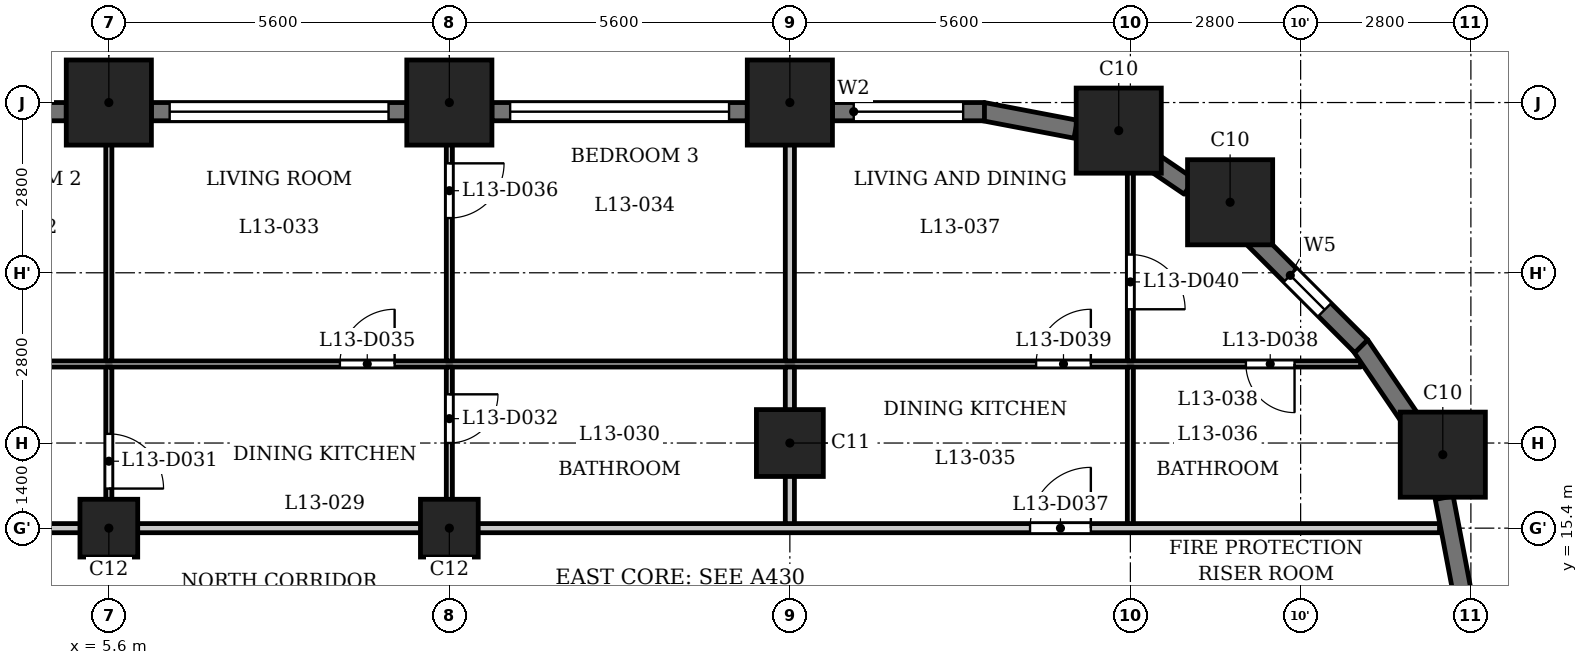
"""IFC4 building model, lengths in metres.
Left out: names, types, materials, properties, quantities, classifications, styles, units other than length and angle.
Written with IfcOpenShell. Run it as: python <this file> out.ifc"""

import sys

from ifc_helpers import new_model, si_unit, direction, frame, frame_2d, origin, origin_2d, place, context, subcontext, project, spatial, rectangle, extrude, element, fill, save


model = new_model("IFC4")
c1 = context("Model", 3, precision=1e-05, world=origin(), true_north=direction((0.0, 1.0)))
c2 = subcontext(c1, "Body", "Model", "MODEL_VIEW")
j1 = project(units=[si_unit("LENGTHUNIT", "METRE"), si_unit("PLANEANGLEUNIT", "RADIAN")], contexts=[c1])
p1 = place(None, origin())
s1 = spatial("IfcSite", under=j1, at=p1, CompositionType="ELEMENT")
p2 = place(p1, origin())
s2 = spatial("IfcBuilding", under=s1, at=p2, CompositionType="ELEMENT")
p3 = place(p2, frame((0.0, 0.0, 55.0)))
s3 = spatial("IfcBuildingStorey", under=s2, at=p3, CompositionType="ELEMENT", Elevation=55.0)
for number, where, z_axis, x_axis in (
    (1, (27.538, 16.609, 0.0), (0.0, 0.0, 1.0), (1.0, 0.0, 0.0)),
    (2, (24.04, 20.76, 0.0), (0.0, 0.0, 1.0), (1.0, 0.0, 0.0)),
    (3, (22.209, 21.938, 0.0), (0.0, 0.0, 1.0), (1.0, 0.0, 0.0)),
    (4, (16.8, 22.4, 0.0), (0.0, 0.0, 1.0), (1.0, 0.0, 0.0)),
    (5, (11.2, 22.4, 0.0), (0.0, 0.0, 1.0), (1.0, 0.0, 0.0)),
    (6, (5.6, 22.4, 0.0), (0.0, 0.0, 1.0), (1.0, 0.0, 0.0)),
):
    element("IfcColumn", number, at=place(p3, frame(where, z_axis=z_axis, x_axis=x_axis)), inside=s3, PredefinedType="COLUMN", context=c2, shape_type="SweptSolid", body=[
        extrude(rectangle(XDim=1.4, YDim=1.4, at=origin_2d()), origin(), (0.0, 0.0, 1.0), 3.5),
    ])
p4 = place(p3, frame((16.8, 16.8, 0.0), z_axis=(0.0, 0.0, 1.0), x_axis=(1.0, 0.0, 0.0)))
e7 = element("IfcColumn", 7, at=p4, inside=s3, PredefinedType="COLUMN", context=c2, shape_type="SweptSolid", body=[
    extrude(rectangle(XDim=1.1, YDim=1.1, at=origin_2d()), origin(), (0.0, 0.0, 1.0), 3.5),
])
for number, where, z_axis, x_axis in (
    (8, (5.6, 15.4, 0.0), (0.0, 0.0, 1.0), (1.0, 0.0, 0.0)),
    (9, (11.2, 15.4, 0.0), (0.0, 0.0, 1.0), (1.0, 0.0, 0.0)),
):
    element("IfcColumn", number, at=place(p3, frame(where, z_axis=z_axis, x_axis=x_axis)), inside=s3, PredefinedType="COLUMN", context=c2, shape_type="SweptSolid", body=[
        extrude(rectangle(XDim=0.95, YDim=0.95, at=origin_2d()), origin(), (0.0, 0.0, 1.0), 3.5),
    ])
for number, where, z_axis, x_axis in (
    (10, (27.853, 14.372, 0.0), (0.0, 0.0, 1.0), (-0.187, 0.982, 0.0)),
    (11, (27.053, 17.126, 0.0), (0.0, 0.0, 1.0), (-0.562, 0.827, 0.0)),
):
    element("IfcWall", number, at=place(p3, frame(where, z_axis=z_axis, x_axis=x_axis)), inside=s3, PredefinedType="SOLIDWALL", context=c2, shape_type="SweptSolid", body=[
        extrude(rectangle(XDim=1.556, YDim=0.3, at=frame_2d((0.778, 0.0))), origin(), (0.0, 0.0, 1.0), 2.35),
    ])
p5 = place(p3, frame((26.197, 18.391, 0.0), z_axis=(0.0, 0.0, 1.0), x_axis=(-0.707057949532, 0.707155609469, 0.0)))
e12 = element("IfcWall", 12, at=p5, inside=s3, PredefinedType="SOLIDWALL", context=c2, shape_type="SweptSolid", body=[
    extrude(rectangle(XDim=2.5, YDim=0.3, at=frame_2d((1.25, 0.0))), origin(), (0.0, 0.0, 1.0), 2.35),
])
p6 = place(p5, frame((0.85, 0.0, 0.6)))
e13 = element("IfcOpeningElement", 13, at=p6, cuts=e12, PredefinedType="OPENING", context=c2, shape_type="SweptSolid", body=[
    extrude(rectangle(XDim=0.8, YDim=1.55, at=frame_2d((0.4, 0.775))), frame((0.0, 0.16, 0.0), z_axis=(0.0, -1.0, 0.0), x_axis=(1.0, 0.0, 0.0)), (0.0, 0.0, 1.0), 0.32),
])
p7 = place(p3, frame((23.368, 21.017, 0.0), z_axis=(0.0, 0.0, 1.0), x_axis=(-0.827037530089, 0.562146710232, 0.0)))
e14 = element("IfcWall", 14, at=p7, inside=s3, PredefinedType="SOLIDWALL", context=c2, shape_type="SweptSolid", body=[
    extrude(rectangle(XDim=0.777, YDim=0.3, at=frame_2d((0.388, 0.0))), origin(), (0.0, 0.0, 1.0), 3.2),
])
p8 = place(p3, frame((21.5, 21.961, 0.0), z_axis=(0.0, 0.0, 1.0), x_axis=(-0.982297345734, 0.187328386968, 0.0)))
e15 = element("IfcWall", 15, at=p8, inside=s3, PredefinedType="SOLIDWALL", context=c2, shape_type="SweptSolid", body=[
    extrude(rectangle(XDim=1.556, YDim=0.3, at=frame_2d((0.778, 0.0))), origin(), (0.0, 0.0, 1.0), 2.35),
])
p9 = place(p3, frame((20.0, 22.25, 0.0), z_axis=(0.0, 0.0, 1.0), x_axis=(-1.0, 0.0, 0.0)))
e16 = element("IfcWall", 16, at=p9, inside=s3, PredefinedType="SOLIDWALL", context=c2, shape_type="SweptSolid", body=[
    extrude(rectangle(XDim=2.5, YDim=0.3, at=frame_2d((1.25, 0.0))), origin(), (0.0, 0.0, 1.0), 2.35),
])
p10 = place(p9, frame((0.35, 0.0, 0.9)))
e17 = element("IfcOpeningElement", 17, at=p10, cuts=e16, PredefinedType="OPENING", context=c2, shape_type="SweptSolid", body=[
    extrude(rectangle(XDim=1.8, YDim=1.25, at=frame_2d((0.9, 0.625))), frame((0.0, 0.16, 0.0), z_axis=(0.0, -1.0, 0.0), x_axis=(1.0, 0.0, 0.0)), (0.0, 0.0, 1.0), 0.32),
])
p11 = place(p3, frame((16.1, 22.25, 0.0), z_axis=(0.0, 0.0, 1.0), x_axis=(-1.0, 0.0, 0.0)))
e18 = element("IfcWall", 18, at=p11, inside=s3, PredefinedType="SOLIDWALL", context=c2, shape_type="SweptSolid", body=[
    extrude(rectangle(XDim=4.2, YDim=0.3, at=frame_2d((2.1, 0.0))), origin(), (0.0, 0.0, 1.0), 2.35),
])
p12 = place(p11, frame((0.3, 0.0, 1.2)))
e19 = element("IfcOpeningElement", 19, at=p12, cuts=e18, PredefinedType="OPENING", context=c2, shape_type="SweptSolid", body=[
    extrude(rectangle(XDim=3.6, YDim=0.95, at=frame_2d((1.8, 0.475))), frame((0.0, 0.16, 0.0), z_axis=(0.0, -1.0, 0.0), x_axis=(1.0, 0.0, 0.0)), (0.0, 0.0, 1.0), 0.32),
])
p13 = place(p3, frame((10.5, 22.25, 0.0), z_axis=(0.0, 0.0, 1.0), x_axis=(-1.0, 0.0, 0.0)))
e20 = element("IfcWall", 20, at=p13, inside=s3, PredefinedType="SOLIDWALL", context=c2, shape_type="SweptSolid", body=[
    extrude(rectangle(XDim=4.2, YDim=0.3, at=frame_2d((2.1, 0.0))), origin(), (0.0, 0.0, 1.0), 2.35),
])
p14 = place(p13, frame((0.3, 0.0, 1.2)))
e21 = element("IfcOpeningElement", 21, at=p14, cuts=e20, PredefinedType="OPENING", context=c2, shape_type="SweptSolid", body=[
    extrude(rectangle(XDim=3.6, YDim=0.95, at=frame_2d((1.8, 0.475))), frame((0.0, 0.16, 0.0), z_axis=(0.0, -1.0, 0.0), x_axis=(1.0, 0.0, 0.0)), (0.0, 0.0, 1.0), 0.32),
])
p15 = place(p3, frame((4.9, 22.25, 0.0), z_axis=(0.0, 0.0, 1.0), x_axis=(-1.0, 0.0, 0.0)))
e22 = element("IfcWall", 22, at=p15, inside=s3, PredefinedType="SOLIDWALL", context=c2, shape_type="SweptSolid", body=[
    extrude(rectangle(XDim=4.2, YDim=0.3, at=frame_2d((2.1, 0.0))), origin(), (0.0, 0.0, 1.0), 2.35),
])
p16 = place(p15, frame((0.512, 0.0, 0.6)))
e23 = element("IfcOpeningElement", 23, at=p16, cuts=e22, PredefinedType="OPENING", context=c2, shape_type="SweptSolid", body=[
    extrude(rectangle(XDim=1.2, YDim=1.55, at=frame_2d((0.6, 0.775))), frame((0.0, 0.16, 0.0), z_axis=(0.0, -1.0, 0.0), x_axis=(1.0, 0.0, 0.0)), (0.0, 0.0, 1.0), 0.32),
])
p17 = place(p15, frame((2.688, 0.0, 0.6)))
e24 = element("IfcOpeningElement", 24, at=p17, cuts=e22, PredefinedType="OPENING", context=c2, shape_type="SweptSolid", body=[
    extrude(rectangle(XDim=1.2, YDim=1.55, at=frame_2d((0.6, 0.775))), frame((0.0, 0.16, 0.0), z_axis=(0.0, -1.0, 0.0), x_axis=(1.0, 0.0, 0.0)), (0.0, 0.0, 1.0), 0.32),
])
p18 = place(p3, frame((-27.484, 15.4, 0.0), z_axis=(0.0, 0.0, 1.0), x_axis=(1.0, 0.0, 0.0)))
e25 = element("IfcWall", 25, at=p18, inside=s3, PredefinedType="PARTITIONING", context=c2, shape_type="SweptSolid", body=[
    extrude(rectangle(XDim=54.968, YDim=0.15, at=frame_2d((27.484, 0.0))), origin(), (0.0, 0.0, 1.0), 3.2),
])
p19 = place(p18, frame((8.784, 0.0, 0.0)))
e26 = element("IfcOpeningElement", 26, at=p19, cuts=e25, PredefinedType="OPENING", context=c2, shape_type="SweptSolid", body=[
    extrude(rectangle(XDim=1.0, YDim=2.1, at=frame_2d((0.5, 1.05))), frame((0.0, 0.085, 0.0), z_axis=(0.0, -1.0, 0.0), x_axis=(1.0, 0.0, 0.0)), (0.0, 0.0, 1.0), 0.17),
])
p20 = place(p18, frame((12.034, 0.0, 0.0)))
e27 = element("IfcOpeningElement", 27, at=p20, cuts=e25, PredefinedType="OPENING", context=c2, shape_type="SweptSolid", body=[
    extrude(rectangle(XDim=1.0, YDim=2.1, at=frame_2d((0.5, 1.05))), frame((0.0, 0.085, 0.0), z_axis=(0.0, -1.0, 0.0), x_axis=(1.0, 0.0, 0.0)), (0.0, 0.0, 1.0), 0.17),
])
p21 = place(p18, frame((16.984, 0.0, 0.0)))
e28 = element("IfcOpeningElement", 28, at=p21, cuts=e25, PredefinedType="OPENING", context=c2, shape_type="SweptSolid", body=[
    extrude(rectangle(XDim=1.0, YDim=2.1, at=frame_2d((0.5, 1.05))), frame((0.0, 0.085, 0.0), z_axis=(0.0, -1.0, 0.0), x_axis=(1.0, 0.0, 0.0)), (0.0, 0.0, 1.0), 0.17),
])
p22 = place(p18, frame((28.184, 0.0, 0.0)))
e29 = element("IfcOpeningElement", 29, at=p22, cuts=e25, PredefinedType="OPENING", context=c2, shape_type="SweptSolid", body=[
    extrude(rectangle(XDim=1.0, YDim=2.1, at=frame_2d((0.5, 1.05))), frame((0.0, 0.085, 0.0), z_axis=(0.0, -1.0, 0.0), x_axis=(1.0, 0.0, 0.0)), (0.0, 0.0, 1.0), 0.17),
])
p23 = place(p18, frame((48.234, 0.0, 0.0)))
e30 = element("IfcOpeningElement", 30, at=p23, cuts=e25, PredefinedType="OPENING", context=c2, shape_type="SweptSolid", body=[
    extrude(rectangle(XDim=1.0, YDim=2.1, at=frame_2d((0.5, 1.05))), frame((0.0, 0.085, 0.0), z_axis=(0.0, -1.0, 0.0), x_axis=(1.0, 0.0, 0.0)), (0.0, 0.0, 1.0), 0.17),
])
p24 = place(p3, frame((-26.44, 18.1, 0.0), z_axis=(0.0, 0.0, 1.0), x_axis=(1.0, 0.0, 0.0)))
e31 = element("IfcWall", 31, at=p24, inside=s3, PredefinedType="PARTITIONING", context=c2, shape_type="SweptSolid", body=[
    extrude(rectangle(XDim=52.63, YDim=0.1, at=frame_2d((26.315, 0.0))), origin(), (0.0, 0.0, 1.0), 3.2),
])
p25 = place(p24, frame((2.626, 0.0, 0.0)))
e32 = element("IfcOpeningElement", 32, at=p25, cuts=e31, PredefinedType="OPENING", context=c2, shape_type="SweptSolid", body=[
    extrude(rectangle(XDim=0.8, YDim=2.1, at=frame_2d((0.4, 1.05))), frame((0.0, 0.06, 0.0), z_axis=(0.0, -1.0, 0.0), x_axis=(1.0, 0.0, 0.0)), (0.0, 0.0, 1.0), 0.12),
])
p26 = place(p24, frame((7.84, 0.0, 0.0)))
e33 = element("IfcOpeningElement", 33, at=p26, cuts=e31, PredefinedType="OPENING", context=c2, shape_type="SweptSolid", body=[
    extrude(rectangle(XDim=0.9, YDim=2.1, at=frame_2d((0.45, 1.05))), frame((0.0, 0.06, 0.0), z_axis=(0.0, -1.0, 0.0), x_axis=(1.0, 0.0, 0.0)), (0.0, 0.0, 1.0), 0.12),
])
p27 = place(p24, frame((13.79, 0.0, 0.0)))
e34 = element("IfcOpeningElement", 34, at=p27, cuts=e31, PredefinedType="OPENING", context=c2, shape_type="SweptSolid", body=[
    extrude(rectangle(XDim=0.8, YDim=2.1, at=frame_2d((0.4, 1.05))), frame((0.0, 0.06, 0.0), z_axis=(0.0, -1.0, 0.0), x_axis=(1.0, 0.0, 0.0)), (0.0, 0.0, 1.0), 0.12),
])
p28 = place(p24, frame((11.09, 0.0, 0.0)))
e35 = element("IfcOpeningElement", 35, at=p28, cuts=e31, PredefinedType="OPENING", context=c2, shape_type="SweptSolid", body=[
    extrude(rectangle(XDim=0.9, YDim=2.1, at=frame_2d((0.45, 1.05))), frame((0.0, 0.06, 0.0), z_axis=(0.0, -1.0, 0.0), x_axis=(1.0, 0.0, 0.0)), (0.0, 0.0, 1.0), 0.12),
])
p29 = place(p24, frame((21.49, 0.0, 0.0)))
e36 = element("IfcOpeningElement", 36, at=p29, cuts=e31, PredefinedType="OPENING", context=c2, shape_type="SweptSolid", body=[
    extrude(rectangle(XDim=0.8, YDim=2.1, at=frame_2d((0.4, 1.05))), frame((0.0, 0.06, 0.0), z_axis=(0.0, -1.0, 0.0), x_axis=(1.0, 0.0, 0.0)), (0.0, 0.0, 1.0), 0.12),
])
p30 = place(p24, frame((15.79, 0.0, 0.0)))
e37 = element("IfcOpeningElement", 37, at=p30, cuts=e31, PredefinedType="OPENING", context=c2, shape_type="SweptSolid", body=[
    extrude(rectangle(XDim=0.9, YDim=2.1, at=frame_2d((0.45, 1.05))), frame((0.0, 0.06, 0.0), z_axis=(0.0, -1.0, 0.0), x_axis=(1.0, 0.0, 0.0)), (0.0, 0.0, 1.0), 0.12),
])
p31 = place(p24, frame((27.49, 0.0, 0.0)))
e38 = element("IfcOpeningElement", 38, at=p31, cuts=e31, PredefinedType="OPENING", context=c2, shape_type="SweptSolid", body=[
    extrude(rectangle(XDim=0.9, YDim=2.1, at=frame_2d((0.45, 1.05))), frame((0.0, 0.06, 0.0), z_axis=(0.0, -1.0, 0.0), x_axis=(1.0, 0.0, 0.0)), (0.0, 0.0, 1.0), 0.12),
])
p32 = place(p24, frame((29.74, 0.0, 0.0)))
e39 = element("IfcOpeningElement", 39, at=p32, cuts=e31, PredefinedType="OPENING", context=c2, shape_type="SweptSolid", body=[
    extrude(rectangle(XDim=0.9, YDim=2.1, at=frame_2d((0.45, 1.05))), frame((0.0, 0.06, 0.0), z_axis=(0.0, -1.0, 0.0), x_axis=(1.0, 0.0, 0.0)), (0.0, 0.0, 1.0), 0.12),
])
p33 = place(p24, frame((35.84, 0.0, 0.0)))
e40 = element("IfcOpeningElement", 40, at=p33, cuts=e31, PredefinedType="OPENING", context=c2, shape_type="SweptSolid", body=[
    extrude(rectangle(XDim=0.9, YDim=2.1, at=frame_2d((0.45, 1.05))), frame((0.0, 0.06, 0.0), z_axis=(0.0, -1.0, 0.0), x_axis=(1.0, 0.0, 0.0)), (0.0, 0.0, 1.0), 0.12),
])
p34 = place(p24, frame((50.74, 0.0, 0.0)))
e41 = element("IfcOpeningElement", 41, at=p34, cuts=e31, PredefinedType="OPENING", context=c2, shape_type="SweptSolid", body=[
    extrude(rectangle(XDim=0.8, YDim=2.1, at=frame_2d((0.4, 1.05))), frame((0.0, 0.06, 0.0), z_axis=(0.0, -1.0, 0.0), x_axis=(1.0, 0.0, 0.0)), (0.0, 0.0, 1.0), 0.12),
])
p35 = place(p24, frame((47.29, 0.0, 0.0)))
e42 = element("IfcOpeningElement", 42, at=p35, cuts=e31, PredefinedType="OPENING", context=c2, shape_type="SweptSolid", body=[
    extrude(rectangle(XDim=0.9, YDim=2.1, at=frame_2d((0.45, 1.05))), frame((0.0, 0.06, 0.0), z_axis=(0.0, -1.0, 0.0), x_axis=(1.0, 0.0, 0.0)), (0.0, 0.0, 1.0), 0.12),
])
p36 = place(p3, frame((5.6, 15.475, 0.0), z_axis=(0.0, 0.0, 1.0), x_axis=(0.0, 1.0, 0.0)))
e43 = element("IfcWall", 43, at=p36, inside=s3, PredefinedType="PARTITIONING", context=c2, shape_type="SweptSolid", body=[
    extrude(rectangle(XDim=2.575, YDim=0.1, at=frame_2d((1.288, 0.0))), origin(), (0.0, 0.0, 1.0), 3.2),
])
p37 = place(p36, frame((0.576, 0.0, 0.0)))
e44 = element("IfcOpeningElement", 44, at=p37, cuts=e43, PredefinedType="OPENING", context=c2, shape_type="SweptSolid", body=[
    extrude(rectangle(XDim=0.9, YDim=2.1, at=frame_2d((0.45, 1.05))), frame((0.0, 0.06, 0.0), z_axis=(0.0, -1.0, 0.0), x_axis=(1.0, 0.0, 0.0)), (0.0, 0.0, 1.0), 0.12),
])
p38 = place(p3, frame((5.6, 18.15, 0.0), z_axis=(0.0, 0.0, 1.0), x_axis=(0.0, 1.0, 0.0)))
e45 = element("IfcWall", 45, at=p38, inside=s3, PredefinedType="PARTITIONING", context=c2, shape_type="SweptSolid", body=[
    extrude(rectangle(XDim=4.93, YDim=0.1, at=frame_2d((2.465, 0.0))), origin(), (0.0, 0.0, 1.0), 3.2),
])
p39 = place(p3, frame((11.2, 15.475, 0.0), z_axis=(0.0, 0.0, 1.0), x_axis=(0.0, 1.0, 0.0)))
e46 = element("IfcWall", 46, at=p39, inside=s3, PredefinedType="PARTITIONING", context=c2, shape_type="SweptSolid", body=[
    extrude(rectangle(XDim=2.575, YDim=0.1, at=frame_2d((1.288, 0.0))), origin(), (0.0, 0.0, 1.0), 3.2),
])
p40 = place(p39, frame((1.326, 0.0, 0.0)))
e47 = element("IfcOpeningElement", 47, at=p40, cuts=e46, PredefinedType="OPENING", context=c2, shape_type="SweptSolid", body=[
    extrude(rectangle(XDim=0.8, YDim=2.1, at=frame_2d((0.4, 1.05))), frame((0.0, 0.06, 0.0), z_axis=(0.0, -1.0, 0.0), x_axis=(1.0, 0.0, 0.0)), (0.0, 0.0, 1.0), 0.12),
])
p41 = place(p3, frame((11.2, 18.15, 0.0), z_axis=(0.0, 0.0, 1.0), x_axis=(0.0, 1.0, 0.0)))
e48 = element("IfcWall", 48, at=p41, inside=s3, PredefinedType="PARTITIONING", context=c2, shape_type="SweptSolid", body=[
    extrude(rectangle(XDim=4.93, YDim=0.1, at=frame_2d((2.465, 0.0))), origin(), (0.0, 0.0, 1.0), 3.2),
])
p42 = place(p41, frame((2.35, 0.0, 0.0)))
e49 = element("IfcOpeningElement", 49, at=p42, cuts=e48, PredefinedType="OPENING", context=c2, shape_type="SweptSolid", body=[
    extrude(rectangle(XDim=0.9, YDim=2.1, at=frame_2d((0.45, 1.05))), frame((0.0, 0.06, 0.0), z_axis=(0.0, -1.0, 0.0), x_axis=(1.0, 0.0, 0.0)), (0.0, 0.0, 1.0), 0.12),
])
p43 = place(p3, frame((16.8, 15.475, 0.0), z_axis=(0.0, 0.0, 1.0), x_axis=(0.0, 1.0, 0.0)))
e50 = element("IfcWall", 50, at=p43, inside=s3, PredefinedType="PARTITIONING", context=c2, shape_type="SweptSolid", body=[
    extrude(rectangle(XDim=2.575, YDim=0.15, at=frame_2d((1.288, 0.0))), origin(), (0.0, 0.0, 1.0), 3.2),
])
p44 = place(p3, frame((16.8, 18.15, 0.0), z_axis=(0.0, 0.0, 1.0), x_axis=(0.0, 1.0, 0.0)))
e51 = element("IfcWall", 51, at=p44, inside=s3, PredefinedType="PARTITIONING", context=c2, shape_type="SweptSolid", body=[
    extrude(rectangle(XDim=4.93, YDim=0.15, at=frame_2d((2.465, 0.0))), origin(), (0.0, 0.0, 1.0), 3.2),
])
p45 = place(p3, frame((22.4, 15.475, 0.0), z_axis=(0.0, 0.0, 1.0), x_axis=(0.0, 1.0, 0.0)))
e52 = element("IfcWall", 52, at=p45, inside=s3, PredefinedType="PARTITIONING", context=c2, shape_type="SweptSolid", body=[
    extrude(rectangle(XDim=2.575, YDim=0.1, at=frame_2d((1.288, 0.0))), origin(), (0.0, 0.0, 1.0), 3.2),
])
p46 = place(p3, frame((22.4, 18.15, 0.0), z_axis=(0.0, 0.0, 1.0), x_axis=(0.0, 1.0, 0.0)))
e53 = element("IfcWall", 53, at=p46, inside=s3, PredefinedType="PARTITIONING", context=c2, shape_type="SweptSolid", body=[
    extrude(rectangle(XDim=3.57, YDim=0.1, at=frame_2d((1.785, 0.0))), origin(), (0.0, 0.0, 1.0), 3.2),
])
p47 = place(p46, frame((0.85, 0.0, 0.0)))
e54 = element("IfcOpeningElement", 54, at=p47, cuts=e53, PredefinedType="OPENING", context=c2, shape_type="SweptSolid", body=[
    extrude(rectangle(XDim=0.9, YDim=2.1, at=frame_2d((0.45, 1.05))), frame((0.0, 0.06, 0.0), z_axis=(0.0, -1.0, 0.0), x_axis=(1.0, 0.0, 0.0)), (0.0, 0.0, 1.0), 0.12),
])
p48 = place(p37, origin())
e55 = element("IfcDoor", 55, at=p48, inside=s3, OperationType="SINGLE_SWING_LEFT", PredefinedType="DOOR", context=c2, shape_type="SweptSolid", body=[
    extrude(rectangle(XDim=0.9, YDim=2.1, at=frame_2d((0.45, 1.05))), frame((0.0, 0.025, 0.0), z_axis=(0.0, -1.0, 0.0), x_axis=(1.0, 0.0, 0.0)), (0.0, 0.0, 1.0), 0.05),
])
fill(e44, e55)
p49 = place(p40, origin())
e56 = element("IfcDoor", 56, at=p49, inside=s3, OperationType="SINGLE_SWING_RIGHT", PredefinedType="DOOR", context=c2, shape_type="SweptSolid", body=[
    extrude(rectangle(XDim=0.8, YDim=2.1, at=frame_2d((0.4, 1.05))), frame((0.0, 0.025, 0.0), z_axis=(0.0, -1.0, 0.0), x_axis=(1.0, 0.0, 0.0)), (0.0, 0.0, 1.0), 0.05),
])
fill(e47, e56)
p50 = place(p33, origin())
e57 = element("IfcDoor", 57, at=p50, inside=s3, OperationType="SINGLE_SWING_LEFT", PredefinedType="DOOR", context=c2, shape_type="SweptSolid", body=[
    extrude(rectangle(XDim=0.9, YDim=2.1, at=frame_2d((0.45, 1.05))), frame((0.0, 0.025, 0.0), z_axis=(0.0, -1.0, 0.0), x_axis=(1.0, 0.0, 0.0)), (0.0, 0.0, 1.0), 0.05),
])
fill(e40, e57)
p51 = place(p42, origin())
e58 = element("IfcDoor", 58, at=p51, inside=s3, OperationType="SINGLE_SWING_RIGHT", PredefinedType="DOOR", context=c2, shape_type="SweptSolid", body=[
    extrude(rectangle(XDim=0.9, YDim=2.1, at=frame_2d((0.45, 1.05))), frame((0.0, 0.025, 0.0), z_axis=(0.0, -1.0, 0.0), x_axis=(1.0, 0.0, 0.0)), (0.0, 0.0, 1.0), 0.05),
])
fill(e49, e58)
p52 = place(p23, origin())
e59 = element("IfcDoor", 59, at=p52, inside=s3, OperationType="SINGLE_SWING_LEFT", PredefinedType="DOOR", context=c2, shape_type="SweptSolid", body=[
    extrude(rectangle(XDim=1.0, YDim=2.1, at=frame_2d((0.5, 1.05))), frame((0.0, 0.025, 0.0), z_axis=(0.0, -1.0, 0.0), x_axis=(1.0, 0.0, 0.0)), (0.0, 0.0, 1.0), 0.05),
])
fill(e30, e59)
p53 = place(p34, origin())
e60 = element("IfcDoor", 60, at=p53, inside=s3, OperationType="SINGLE_SWING_RIGHT", PredefinedType="DOOR", context=c2, shape_type="SweptSolid", body=[
    extrude(rectangle(XDim=0.8, YDim=2.1, at=frame_2d((0.4, 1.05))), frame((0.0, 0.025, 0.0), z_axis=(0.0, -1.0, 0.0), x_axis=(1.0, 0.0, 0.0)), (0.0, 0.0, 1.0), 0.05),
])
fill(e41, e60)
p54 = place(p35, origin())
e61 = element("IfcDoor", 61, at=p54, inside=s3, OperationType="SINGLE_SWING_LEFT", PredefinedType="DOOR", context=c2, shape_type="SweptSolid", body=[
    extrude(rectangle(XDim=0.9, YDim=2.1, at=frame_2d((0.45, 1.05))), frame((0.0, 0.025, 0.0), z_axis=(0.0, -1.0, 0.0), x_axis=(1.0, 0.0, 0.0)), (0.0, 0.0, 1.0), 0.05),
])
fill(e42, e61)
p55 = place(p47, origin())
e62 = element("IfcDoor", 62, at=p55, inside=s3, OperationType="SINGLE_SWING_LEFT", PredefinedType="DOOR", context=c2, shape_type="SweptSolid", body=[
    extrude(rectangle(XDim=0.9, YDim=2.1, at=frame_2d((0.45, 1.05))), frame((0.0, 0.025, 0.0), z_axis=(0.0, -1.0, 0.0), x_axis=(1.0, 0.0, 0.0)), (0.0, 0.0, 1.0), 0.05),
])
fill(e54, e62)
p56 = place(p6, origin())
e63 = element("IfcWindow", 63, at=p56, inside=s3, PartitioningType="SINGLE_PANEL", PredefinedType="WINDOW", context=c2, shape_type="SweptSolid", body=[
    extrude(rectangle(XDim=0.8, YDim=1.55, at=frame_2d((0.4, 0.775))), frame((0.0, 0.03, 0.0), z_axis=(0.0, -1.0, 0.0), x_axis=(1.0, 0.0, 0.0)), (0.0, 0.0, 1.0), 0.06),
])
fill(e13, e63)
p57 = place(p10, origin())
e64 = element("IfcWindow", 64, at=p57, inside=s3, PartitioningType="SINGLE_PANEL", PredefinedType="WINDOW", context=c2, shape_type="SweptSolid", body=[
    extrude(rectangle(XDim=1.8, YDim=1.25, at=frame_2d((0.9, 0.625))), frame((0.0, 0.03, 0.0), z_axis=(0.0, -1.0, 0.0), x_axis=(1.0, 0.0, 0.0)), (0.0, 0.0, 1.0), 0.06),
])
fill(e17, e64)
p58 = place(p12, origin())
e65 = element("IfcWindow", 65, at=p58, inside=s3, PartitioningType="SINGLE_PANEL", PredefinedType="WINDOW", context=c2, shape_type="SweptSolid", body=[
    extrude(rectangle(XDim=3.6, YDim=0.95, at=frame_2d((1.8, 0.475))), frame((0.0, 0.03, 0.0), z_axis=(0.0, -1.0, 0.0), x_axis=(1.0, 0.0, 0.0)), (0.0, 0.0, 1.0), 0.06),
])
fill(e19, e65)
p59 = place(p14, origin())
e66 = element("IfcWindow", 66, at=p59, inside=s3, PartitioningType="SINGLE_PANEL", PredefinedType="WINDOW", context=c2, shape_type="SweptSolid", body=[
    extrude(rectangle(XDim=3.6, YDim=0.95, at=frame_2d((1.8, 0.475))), frame((0.0, 0.03, 0.0), z_axis=(0.0, -1.0, 0.0), x_axis=(1.0, 0.0, 0.0)), (0.0, 0.0, 1.0), 0.06),
])
fill(e21, e66)
save(model, sys.argv[1])
